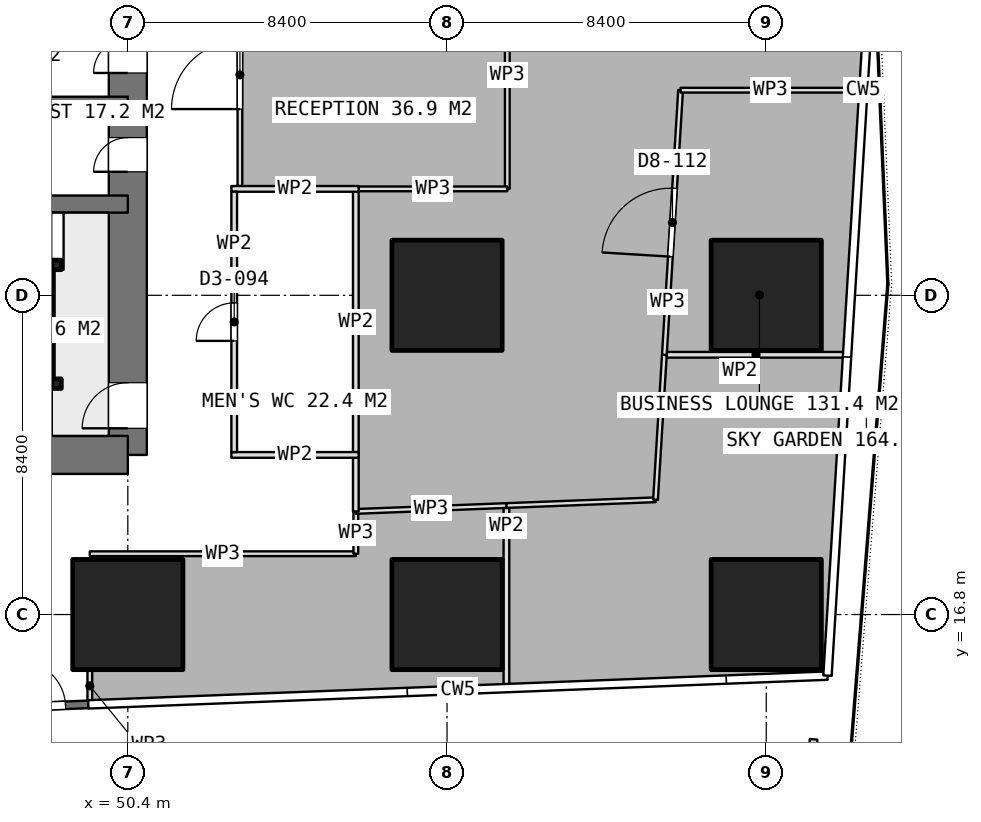
"""IFC4 building model, lengths in metres.
Left out: names, types, materials, properties, quantities, classifications, styles, units other than length and angle.
Written with IfcOpenShell. Run it as: python <this file> out.ifc"""

import sys

from ifc_helpers import new_model, si_unit, direction, frame, frame_2d, origin, origin_2d, place, context, subcontext, project, spatial, rectangle, extrude, element, fill, save


model = new_model("IFC4")
c1 = context("Model", 3, precision=1e-05, world=origin(), true_north=direction((0.0, 1.0)))
c2 = subcontext(c1, "Body", "Model", "MODEL_VIEW")
j1 = project(units=[si_unit("LENGTHUNIT", "METRE"), si_unit("PLANEANGLEUNIT", "RADIAN")], contexts=[c1])
p1 = place(None, origin())
s1 = spatial("IfcSite", under=j1, at=p1, CompositionType="ELEMENT")
p2 = place(p1, origin())
s2 = spatial("IfcBuilding", under=s1, at=p2, CompositionType="ELEMENT")
p3 = place(p2, frame((0.0, 0.0, 90.8)))
s3 = spatial("IfcBuildingStorey", under=s2, at=p3, CompositionType="ELEMENT", Elevation=90.8)
p4 = place(p3, frame((40.0, 21.0, 0.0), z_axis=(0.0, 0.0, 1.0), x_axis=(1.0, 0.0, 0.0)))
e1 = element("IfcWall", 1, at=p4, inside=s3, PredefinedType="SHEAR", context=c2, shape_type="SweptSolid", body=[
    extrude(rectangle(XDim=10.4, YDim=1.0, at=frame_2d((5.2, 0.0))), origin(), (0.0, 0.0, 1.0), 4.5),
])
p5 = place(p3, frame((50.4, 21.0, 0.0), z_axis=(0.0, 0.0, 1.0), x_axis=(0.0, 1.0, 0.0)))
e2 = element("IfcWall", 2, at=p5, inside=s3, PredefinedType="SHEAR", context=c2, shape_type="SweptSolid", body=[
    extrude(rectangle(XDim=25.2, YDim=1.0, at=frame_2d((12.6, 0.0))), origin(), (0.0, 0.0, 1.0), 4.5),
])
p6 = place(p5, frame((16.2, 0.0, 0.0)))
e3 = element("IfcOpeningElement", 3, at=p6, cuts=e2, PredefinedType="OPENING", context=c2, shape_type="SweptSolid", body=[
    extrude(rectangle(XDim=1.2, YDim=2.1, at=frame_2d((0.6, 1.05))), frame((0.0, 0.51, 0.0), z_axis=(0.0, -1.0, 0.0), x_axis=(1.0, 0.0, 0.0)), (0.0, 0.0, 1.0), 1.02),
])
p7 = place(p5, frame((10.05, 0.0, 0.0)))
e4 = element("IfcOpeningElement", 4, at=p7, cuts=e2, PredefinedType="OPENING", context=c2, shape_type="SweptSolid", body=[
    extrude(rectangle(XDim=0.9, YDim=2.1, at=frame_2d((0.45, 1.05))), frame((0.0, 0.51, 0.0), z_axis=(0.0, -1.0, 0.0), x_axis=(1.0, 0.0, 0.0)), (0.0, 0.0, 1.0), 1.02),
])
p8 = place(p5, frame((7.45, 0.0, 0.0)))
e5 = element("IfcOpeningElement", 5, at=p8, cuts=e2, PredefinedType="OPENING", context=c2, shape_type="SweptSolid", body=[
    extrude(rectangle(XDim=0.9, YDim=2.1, at=frame_2d((0.45, 1.05))), frame((0.0, 0.51, 0.0), z_axis=(0.0, -1.0, 0.0), x_axis=(1.0, 0.0, 0.0)), (0.0, 0.0, 1.0), 1.02),
])
p9 = place(p5, frame((0.7, 0.0, 0.0)))
e6 = element("IfcOpeningElement", 6, at=p9, cuts=e2, PredefinedType="OPENING", context=c2, shape_type="SweptSolid", body=[
    extrude(rectangle(XDim=1.2, YDim=2.1, at=frame_2d((0.6, 1.05))), frame((0.0, 0.51, 0.0), z_axis=(0.0, -1.0, 0.0), x_axis=(1.0, 0.0, 0.0)), (0.0, 0.0, 1.0), 1.02),
])
for number, where, z_axis, x_axis in (
    (7, (43.8, 27.6, 0.0), (0.0, 0.0, 1.0), (1.0, 0.0, 0.0)),
    (8, (43.8, 30.2, 0.0), (0.0, 0.0, 1.0), (1.0, 0.0, 0.0)),
):
    element("IfcWall", number, at=place(p3, frame(where, z_axis=z_axis, x_axis=x_axis)), inside=s3, PredefinedType="SHEAR", context=c2, shape_type="SweptSolid", body=[
        extrude(rectangle(XDim=6.6, YDim=0.45, at=frame_2d((3.3, 0.0))), origin(), (0.0, 0.0, 1.0), 4.5),
    ])
for number, where, z_axis, x_axis in (
    (9, (50.4, 16.8, 0.0), (0.0, 0.0, 1.0), (1.0, 0.0, 0.0)),
    (10, (58.8, 16.8, 0.0), (0.0, 0.0, 1.0), (1.0, 0.0, 0.0)),
    (11, (58.8, 25.2, 0.0), (0.0, 0.0, 1.0), (1.0, 0.0, 0.0)),
    (12, (67.2, 16.8, 0.0), (0.0, 0.0, 1.0), (1.0, 0.0, 0.0)),
    (13, (67.2, 25.2, 0.0), (0.0, 0.0, 1.0), (1.0, 0.0, 0.0)),
):
    element("IfcColumn", number, at=place(p3, frame(where, z_axis=z_axis, x_axis=x_axis)), inside=s3, PredefinedType="COLUMN", context=c2, shape_type="SweptSolid", body=[
        extrude(rectangle(XDim=2.9, YDim=2.9, at=origin_2d()), origin(), (0.0, 0.0, 1.0), 4.5),
    ])
p10 = place(p3, frame((45.163, 14.272, 0.0), z_axis=(0.0, 0.0, 1.0), x_axis=(0.999243554769, 0.03888853625, 0.0)))
e14 = element("IfcWall", 14, at=p10, inside=s3, PredefinedType="SOLIDWALL", context=c2, shape_type="SweptSolid", body=[
    extrude(rectangle(XDim=4.2, YDim=0.2, at=frame_2d((2.1, 0.0))), origin(), (0.0, 0.0, 1.0), 4.25),
])
p11 = place(p10, frame((0.6, 0.0, 0.0)))
e15 = element("IfcOpeningElement", 15, at=p11, cuts=e14, PredefinedType="OPENING", context=c2, shape_type="SweptSolid", body=[
    extrude(rectangle(XDim=1.2, YDim=2.4, at=frame_2d((0.6, 1.2))), frame((0.0, 0.11, 0.0), z_axis=(0.0, -1.0, 0.0), x_axis=(1.0, 0.0, 0.0)), (0.0, 0.0, 1.0), 0.22),
])
p12 = place(p10, frame((2.4, 0.0, 0.0)))
e16 = element("IfcOpeningElement", 16, at=p12, cuts=e14, PredefinedType="OPENING", context=c2, shape_type="SweptSolid", body=[
    extrude(rectangle(XDim=1.2, YDim=2.4, at=frame_2d((0.6, 1.2))), frame((0.0, 0.11, 0.0), z_axis=(0.0, -1.0, 0.0), x_axis=(1.0, 0.0, 0.0)), (0.0, 0.0, 1.0), 0.22),
])
p13 = place(p3, frame((67.978, 7.622, 0.0), z_axis=(0.0, 0.0, 1.0), x_axis=(0.079133230428, 0.996864048826, 0.0)))
e17 = element("IfcWall", 17, at=p13, inside=s3, PredefinedType="USERDEFINED", context=c2, shape_type="SweptSolid", body=[
    extrude(rectangle(XDim=5.914, YDim=0.2, at=frame_2d((2.957, 0.0))), origin(), (0.0, 0.0, 1.0), 0.6),
])
for number, where, z_axis, x_axis in (
    (18, (53.125, 21.0, 0.0), (0.0, 0.0, 1.0), (1.0, 0.0, 0.0)),
    (19, (53.125, 28.0, 0.0), (0.0, 0.0, 1.0), (1.0, 0.0, 0.0)),
):
    element("IfcWall", number, at=place(p3, frame(where, z_axis=z_axis, x_axis=x_axis)), inside=s3, PredefinedType="PARTITIONING", context=c2, shape_type="SweptSolid", body=[
        extrude(rectangle(XDim=3.35, YDim=0.15, at=frame_2d((1.675, 0.0))), origin(), (0.0, 0.0, 1.0), 4.25),
    ])
p14 = place(p3, frame((53.2, 21.075, 0.0), z_axis=(0.0, 0.0, 1.0), x_axis=(0.0, 1.0, 0.0)))
e20 = element("IfcWall", 20, at=p14, inside=s3, PredefinedType="PARTITIONING", context=c2, shape_type="SweptSolid", body=[
    extrude(rectangle(XDim=6.85, YDim=0.15, at=frame_2d((3.425, 0.0))), origin(), (0.0, 0.0, 1.0), 4.25),
])
p15 = place(p14, frame((2.925, 0.0, 0.0)))
e21 = element("IfcOpeningElement", 21, at=p15, cuts=e20, PredefinedType="OPENING", context=c2, shape_type="SweptSolid", body=[
    extrude(rectangle(XDim=1.0, YDim=2.1, at=frame_2d((0.5, 1.05))), frame((0.0, 0.085, 0.0), z_axis=(0.0, -1.0, 0.0), x_axis=(1.0, 0.0, 0.0)), (0.0, 0.0, 1.0), 0.17),
])
p16 = place(p3, frame((56.4, 21.075, 0.0), z_axis=(0.0, 0.0, 1.0), x_axis=(0.0, 1.0, 0.0)))
e22 = element("IfcWall", 22, at=p16, inside=s3, PredefinedType="PARTITIONING", context=c2, shape_type="SweptSolid", body=[
    extrude(rectangle(XDim=6.85, YDim=0.15, at=frame_2d((3.425, 0.0))), origin(), (0.0, 0.0, 1.0), 4.25),
])
p17 = place(p3, frame((49.4, 18.4, 0.0), z_axis=(0.0, 0.0, 1.0), x_axis=(1.0, 0.0, 0.0)))
e23 = element("IfcWall", 23, at=p17, inside=s3, PredefinedType="PARTITIONING", context=c2, shape_type="SweptSolid", body=[
    extrude(rectangle(XDim=7.0, YDim=0.125, at=frame_2d((3.5, 0.0))), origin(), (0.0, 0.0, 1.0), 4.25),
])
p18 = place(p3, frame((56.4, 18.4, 0.0), z_axis=(0.0, 0.0, 1.0), x_axis=(0.0, 1.0, 0.0)))
e24 = element("IfcWall", 24, at=p18, inside=s3, PredefinedType="PARTITIONING", context=c2, shape_type="SweptSolid", body=[
    extrude(rectangle(XDim=1.113, YDim=0.125, at=frame_2d((0.557, 0.0))), origin(), (0.0, 0.0, 1.0), 4.25),
])
p19 = place(p3, frame((56.4, 19.513, 0.0), z_axis=(0.0, 0.0, 1.0), x_axis=(0.999236150062, 0.039078336841, 0.0)))
e25 = element("IfcWall", 25, at=p19, inside=s3, PredefinedType="PARTITIONING", context=c2, shape_type="SweptSolid", body=[
    extrude(rectangle(XDim=3.967, YDim=0.125, at=frame_2d((1.983, 0.0))), origin(), (0.0, 0.0, 1.0), 4.25),
])
p20 = place(p3, frame((60.364, 19.668, 0.0), z_axis=(0.0, 0.0, 1.0), x_axis=(0.999248811144, 0.038753237633, 0.0)))
e26 = element("IfcWall", 26, at=p20, inside=s3, PredefinedType="PARTITIONING", context=c2, shape_type="SweptSolid", body=[
    extrude(rectangle(XDim=3.925, YDim=0.125, at=frame_2d((1.962, 0.0))), origin(), (0.0, 0.0, 1.0), 4.25),
])
p21 = place(p3, frame((64.286, 19.82, 0.0), z_axis=(0.0, 0.0, 1.0), x_axis=(0.061033398436, 0.998135724376, 0.0)))
e27 = element("IfcWall", 27, at=p21, inside=s3, PredefinedType="PARTITIONING", context=c2, shape_type="SweptSolid", body=[
    extrude(rectangle(XDim=3.82, YDim=0.125, at=frame_2d((1.91, 0.0))), origin(), (0.0, 0.0, 1.0), 4.25),
])
p22 = place(p3, frame((64.519, 23.633, 0.0), z_axis=(0.0, 0.0, 1.0), x_axis=(0.061201842045, 0.998125410222, 0.0)))
e28 = element("IfcWall", 28, at=p22, inside=s3, PredefinedType="PARTITIONING", context=c2, shape_type="SweptSolid", body=[
    extrude(rectangle(XDim=6.977, YDim=0.125, at=frame_2d((3.489, 0.0))), origin(), (0.0, 0.0, 1.0), 4.25),
])
p23 = place(p22, frame((2.589, 0.0, 0.0)))
e29 = element("IfcOpeningElement", 29, at=p23, cuts=e28, PredefinedType="OPENING", context=c2, shape_type="SweptSolid", body=[
    extrude(rectangle(XDim=1.8, YDim=2.1, at=frame_2d((0.9, 1.05))), frame((0.0, 0.073, 0.0), z_axis=(0.0, -1.0, 0.0), x_axis=(1.0, 0.0, 0.0)), (0.0, 0.0, 1.0), 0.145),
])
p24 = place(p3, frame((64.946, 30.597, 0.0), z_axis=(0.0, 0.0, 1.0), x_axis=(1.0, 0.0, 0.0)))
e30 = element("IfcWall", 30, at=p24, inside=s3, PredefinedType="PARTITIONING", context=c2, shape_type="SweptSolid", body=[
    extrude(rectangle(XDim=4.729, YDim=0.125, at=frame_2d((2.365, 0.0))), origin(), (0.0, 0.0, 1.0), 4.25),
])
p25 = place(p3, frame((49.4, 14.517, 0.0), z_axis=(0.0, 0.0, 1.0), x_axis=(0.0, 1.0, 0.0)))
e31 = element("IfcWall", 31, at=p25, inside=s3, PredefinedType="PARTITIONING", context=c2, shape_type="SweptSolid", body=[
    extrude(rectangle(XDim=0.813, YDim=0.125, at=frame_2d((0.406, 0.0))), origin(), (0.0, 0.0, 1.0), 4.25),
])
p26 = place(p3, frame((60.386, 34.0, 0.0), z_axis=(0.0, 0.0, 1.0), x_axis=(0.0, -1.0, 0.0)))
e32 = element("IfcWall", 32, at=p26, inside=s3, PredefinedType="PARTITIONING", context=c2, shape_type="SweptSolid", body=[
    extrude(rectangle(XDim=6.0, YDim=0.125, at=frame_2d((3.0, 0.0))), origin(), (0.0, 0.0, 1.0), 4.25),
])
p27 = place(p3, frame((60.386, 28.0, 0.0), z_axis=(0.0, 0.0, 1.0), x_axis=(-1.0, 0.0, 0.0)))
e33 = element("IfcWall", 33, at=p27, inside=s3, PredefinedType="PARTITIONING", context=c2, shape_type="SweptSolid", body=[
    extrude(rectangle(XDim=3.911, YDim=0.125, at=frame_2d((1.956, 0.0))), origin(), (0.0, 0.0, 1.0), 4.25),
])
p28 = place(p3, frame((53.35, 28.075, 0.0), z_axis=(0.0, 0.0, 1.0), x_axis=(0.0, 1.0, 0.0)))
e34 = element("IfcWall", 34, at=p28, inside=s3, PredefinedType="PARTITIONING", context=c2, shape_type="SweptSolid", body=[
    extrude(rectangle(XDim=5.925, YDim=0.125, at=frame_2d((2.962, 0.0))), origin(), (0.0, 0.0, 1.0), 4.25),
])
p29 = place(p28, frame((2.025, 0.0, 0.0)))
e35 = element("IfcOpeningElement", 35, at=p29, cuts=e34, PredefinedType="OPENING", context=c2, shape_type="SweptSolid", body=[
    extrude(rectangle(XDim=1.8, YDim=2.1, at=frame_2d((0.9, 1.05))), frame((0.0, 0.073, 0.0), z_axis=(0.0, -1.0, 0.0), x_axis=(1.0, 0.0, 0.0)), (0.0, 0.0, 1.0), 0.145),
])
p30 = place(p3, frame((64.582, 23.635, 0.0), z_axis=(0.0, 0.0, 1.0), x_axis=(1.0, 0.0, 0.0)))
e36 = element("IfcWall", 36, at=p30, inside=s3, PredefinedType="PARTITIONING", context=c2, shape_type="SweptSolid", body=[
    extrude(rectangle(XDim=4.697, YDim=0.15, at=frame_2d((2.349, 0.0))), origin(), (0.0, 0.0, 1.0), 4.25),
])
p31 = place(p3, frame((60.363, 19.605, 0.0), z_axis=(0.0, 0.0, 1.0), x_axis=(0.0, -1.0, 0.0)))
e37 = element("IfcWall", 37, at=p31, inside=s3, PredefinedType="PARTITIONING", context=c2, shape_type="SweptSolid", body=[
    extrude(rectangle(XDim=4.661, YDim=0.15, at=frame_2d((2.331, 0.0))), origin(), (0.0, 0.0, 1.0), 4.25),
])
p32 = place(p3, frame((56.4, 19.513, 0.0), z_axis=(0.0, 0.0, 1.0), x_axis=(0.0, 1.0, 0.0)))
e38 = element("IfcWall", 38, at=p32, inside=s3, PredefinedType="PARTITIONING", context=c2, shape_type="SweptSolid", body=[
    extrude(rectangle(XDim=1.562, YDim=0.15, at=frame_2d((0.781, 0.0))), origin(), (0.0, 0.0, 1.0), 4.25),
])
for number, where, z_axis, x_axis in (
    (39, (48.525, 22.875, 0.0), (0.0, 0.0, 1.0), (1.0, 0.0, 0.0)),
    (40, (48.525, 26.0, 0.0), (0.0, 0.0, 1.0), (1.0, 0.0, 0.0)),
):
    element("IfcColumn", number, at=place(p3, frame(where, z_axis=z_axis, x_axis=x_axis)), inside=s3, PredefinedType="COLUMN", context=c2, shape_type="SweptSolid", body=[
        extrude(rectangle(XDim=0.25, YDim=0.25, at=origin_2d()), origin(), (0.0, 0.0, 1.0), 4.5),
    ])
p33 = place(p12, origin())
e41 = element("IfcDoor", 41, at=p33, inside=s3, OperationType="SINGLE_SWING_LEFT", PredefinedType="DOOR", context=c2, shape_type="SweptSolid", body=[
    extrude(rectangle(XDim=1.2, YDim=2.4, at=frame_2d((0.6, 1.2))), frame((0.0, 0.025, 0.0), z_axis=(0.0, -1.0, 0.0), x_axis=(1.0, 0.0, 0.0)), (0.0, 0.0, 1.0), 0.05),
])
fill(e16, e41)
p34 = place(p7, origin())
e42 = element("IfcDoor", 42, at=p34, inside=s3, OperationType="SINGLE_SWING_LEFT", PredefinedType="DOOR", context=c2, shape_type="SweptSolid", body=[
    extrude(rectangle(XDim=0.9, YDim=2.1, at=frame_2d((0.45, 1.05))), frame((0.0, 0.025, 0.0), z_axis=(0.0, -1.0, 0.0), x_axis=(1.0, 0.0, 0.0)), (0.0, 0.0, 1.0), 0.05),
])
fill(e4, e42)
p35 = place(p8, origin())
e43 = element("IfcDoor", 43, at=p35, inside=s3, OperationType="SINGLE_SWING_LEFT", PredefinedType="DOOR", context=c2, shape_type="SweptSolid", body=[
    extrude(rectangle(XDim=0.9, YDim=2.1, at=frame_2d((0.45, 1.05))), frame((0.0, 0.025, 0.0), z_axis=(0.0, -1.0, 0.0), x_axis=(1.0, 0.0, 0.0)), (0.0, 0.0, 1.0), 0.05),
])
fill(e5, e43)
p36 = place(p15, origin())
e44 = element("IfcDoor", 44, at=p36, inside=s3, OperationType="SINGLE_SWING_LEFT", PredefinedType="DOOR", context=c2, shape_type="SweptSolid", body=[
    extrude(rectangle(XDim=1.0, YDim=2.1, at=frame_2d((0.5, 1.05))), frame((0.0, 0.025, 0.0), z_axis=(0.0, -1.0, 0.0), x_axis=(1.0, 0.0, 0.0)), (0.0, 0.0, 1.0), 0.05),
])
fill(e21, e44)
p37 = place(p23, origin())
e45 = element("IfcDoor", 45, at=p37, inside=s3, OperationType="DOUBLE_DOOR_SINGLE_SWING", PredefinedType="DOOR", context=c2, shape_type="SweptSolid", body=[
    extrude(rectangle(XDim=1.8, YDim=2.1, at=frame_2d((0.9, 1.05))), frame((0.0, 0.025, 0.0), z_axis=(0.0, -1.0, 0.0), x_axis=(1.0, 0.0, 0.0)), (0.0, 0.0, 1.0), 0.05),
])
fill(e29, e45)
p38 = place(p29, origin())
e46 = element("IfcDoor", 46, at=p38, inside=s3, OperationType="DOUBLE_DOOR_SINGLE_SWING", PredefinedType="DOOR", context=c2, shape_type="SweptSolid", body=[
    extrude(rectangle(XDim=1.8, YDim=2.1, at=frame_2d((0.9, 1.05))), frame((0.0, 0.025, 0.0), z_axis=(0.0, -1.0, 0.0), x_axis=(1.0, 0.0, 0.0)), (0.0, 0.0, 1.0), 0.05),
])
fill(e35, e46)
p39 = place(p9, origin())
e47 = element("IfcDoor", 47, at=p39, inside=s3, OperationType="SINGLE_SWING_RIGHT", PredefinedType="DOOR", context=c2, shape_type="SweptSolid", body=[
    extrude(rectangle(XDim=1.2, YDim=2.1, at=frame_2d((0.6, 1.05))), frame((0.0, 0.025, 0.0), z_axis=(0.0, -1.0, 0.0), x_axis=(1.0, 0.0, 0.0)), (0.0, 0.0, 1.0), 0.05),
])
fill(e6, e47)
save(model, sys.argv[1])
